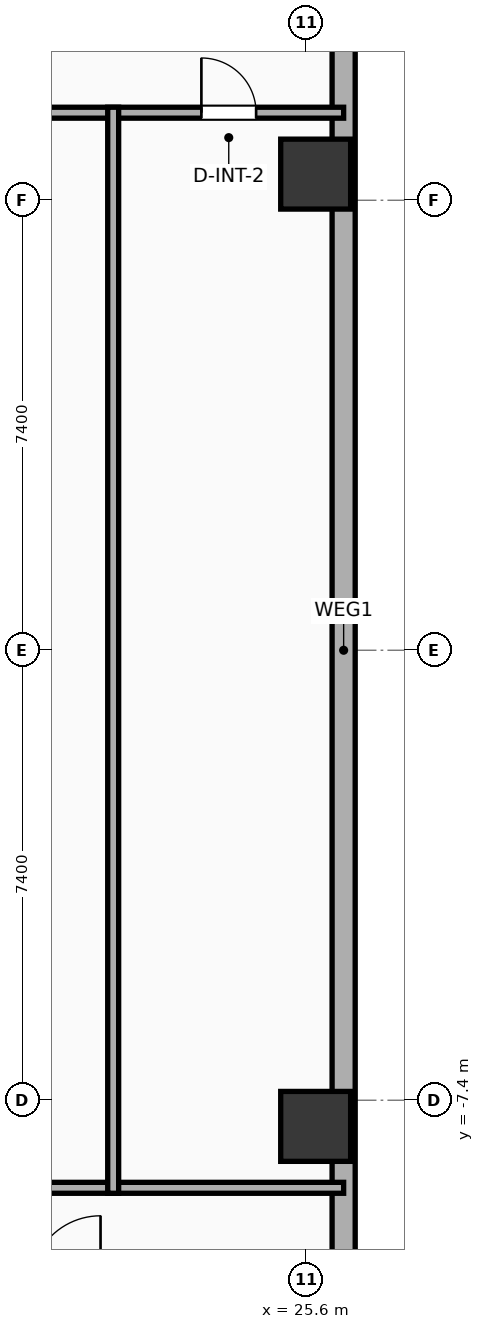
"""IFC4 building model, lengths in metres.
Left out: names, types, materials, properties, quantities, classifications, styles, units other than length and angle.
Written with IfcOpenShell. Run it as: python <this file> out.ifc"""

import sys

from ifc_helpers import new_model, si_unit, direction, frame, frame_2d, origin, origin_2d, place, context, subcontext, project, spatial, rectangle, hollow_rectangle, extrude, element, fill, save


model = new_model("IFC4")
c1 = context("Model", 3, precision=1e-05, world=origin(), true_north=direction((0.0, 1.0)))
c2 = subcontext(c1, "Body", "Model", "MODEL_VIEW")
j1 = project(units=[si_unit("LENGTHUNIT", "METRE"), si_unit("PLANEANGLEUNIT", "RADIAN")], contexts=[c1])
p1 = place(None, origin())
s1 = spatial("IfcSite", under=j1, at=p1, CompositionType="ELEMENT")
p2 = place(p1, origin())
s2 = spatial("IfcBuilding", under=s1, at=p2, CompositionType="ELEMENT")
p3 = place(p2, frame((0.0, 0.0, 57.2)))
s3 = spatial("IfcBuildingStorey", under=s2, at=p3, CompositionType="ELEMENT", Elevation=57.2)
for number, where, z_axis, x_axis in (
    (1, (25.75, -7.83, 0.0), (0.0, 0.0, 1.0), (1.0, 0.0, 0.0)),
    (2, (25.75, 7.83, 0.0), (0.0, 0.0, 1.0), (1.0, 0.0, 0.0)),
):
    element("IfcColumn", number, at=place(p3, frame(where, z_axis=z_axis, x_axis=x_axis)), inside=s3, PredefinedType="COLUMN", context=c2, shape_type="SweptSolid", body=[
        extrude(hollow_rectangle(XDim=1.15, YDim=1.15, WallThickness=0.04, at=origin_2d()), origin(), (0.0, 0.0, 1.0), 3.9),
    ])
p4 = place(p3, frame((26.21, 18.381, 0.0), z_axis=(0.0, 0.0, 1.0), x_axis=(0.0, -1.0, 0.0)))
e3 = element("IfcWall", 3, at=p4, inside=s3, PredefinedType="ELEMENTEDWALL", context=c2, shape_type="SweptSolid", body=[
    extrude(rectangle(XDim=36.763, YDim=0.38, at=frame_2d((18.381, 0.0))), origin(), (0.0, 0.0, 1.0), 3.65),
])
p5 = place(p4, frame((33.362, 0.0, 0.75)))
e4 = element("IfcOpeningElement", 4, at=p5, cuts=e3, PredefinedType="OPENING", context=c2, shape_type="SweptSolid", body=[
    extrude(rectangle(XDim=1.2, YDim=2.05, at=frame_2d((0.6, 1.025))), frame((0.0, 0.2, 0.0), z_axis=(0.0, -1.0, 0.0), x_axis=(1.0, 0.0, 0.0)), (0.0, 0.0, 1.0), 0.4),
])
p6 = place(p3, frame((9.88, 8.84, 0.0), z_axis=(0.0, 0.0, 1.0), x_axis=(1.0, 0.0, 0.0)))
e5 = element("IfcWall", 5, at=p6, inside=s3, PredefinedType="PARTITIONING", context=c2, shape_type="SweptSolid", body=[
    extrude(rectangle(XDim=16.33, YDim=0.18, at=frame_2d((8.165, 0.0))), origin(), (0.0, 0.0, 1.0), 3.65),
])
p7 = place(p6, frame((13.99, 0.0, 0.0)))
e6 = element("IfcOpeningElement", 6, at=p7, cuts=e5, PredefinedType="OPENING", context=c2, shape_type="SweptSolid", body=[
    extrude(rectangle(XDim=0.9, YDim=2.05, at=frame_2d((0.45, 1.025))), frame((0.0, 0.1, 0.0), z_axis=(0.0, -1.0, 0.0), x_axis=(1.0, 0.0, 0.0)), (0.0, 0.0, 1.0), 0.2),
])
p8 = place(p3, frame((9.88, -8.84, 0.0), z_axis=(0.0, 0.0, 1.0), x_axis=(1.0, 0.0, 0.0)))
e7 = element("IfcWall", 7, at=p8, inside=s3, PredefinedType="PARTITIONING", context=c2, shape_type="SweptSolid", body=[
    extrude(rectangle(XDim=16.33, YDim=0.18, at=frame_2d((8.165, 0.0))), origin(), (0.0, 0.0, 1.0), 3.65),
])
p9 = place(p3, frame((22.42, -8.93, 0.0), z_axis=(0.0, 0.0, 1.0), x_axis=(0.0, 1.0, 0.0)))
e8 = element("IfcWall", 8, at=p9, inside=s3, PredefinedType="PARTITIONING", context=c2, shape_type="SweptSolid", body=[
    extrude(rectangle(XDim=17.86, YDim=0.18, at=frame_2d((8.93, 0.0))), origin(), (0.0, 0.0, 1.0), 3.65),
])
p10 = place(p7, origin())
e9 = element("IfcDoor", 9, at=p10, inside=s3, OperationType="SINGLE_SWING_LEFT", PredefinedType="DOOR", context=c2, shape_type="SweptSolid", body=[
    extrude(rectangle(XDim=0.9, YDim=2.05, at=frame_2d((0.45, 1.025))), frame((0.0, 0.025, 0.0), z_axis=(0.0, -1.0, 0.0), x_axis=(1.0, 0.0, 0.0)), (0.0, 0.0, 1.0), 0.05),
])
fill(e6, e9)
save(model, sys.argv[1])
